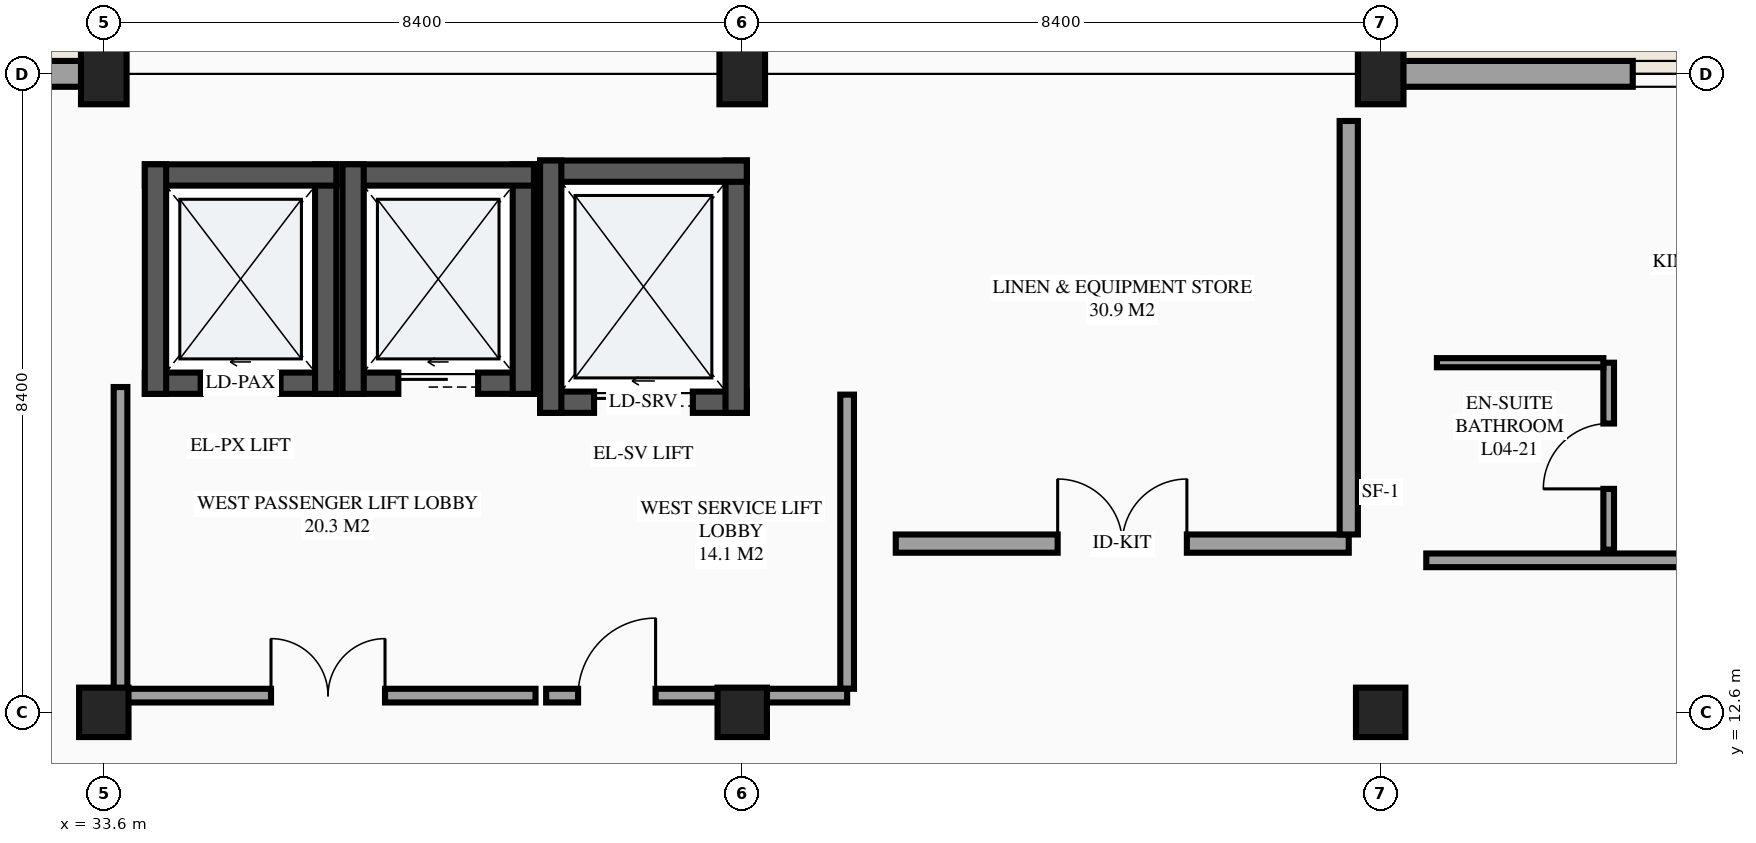
"""IFC4 building model, lengths in metres.
Left out: names, types, materials, properties, quantities, classifications, styles, units other than length and angle.
Written with IfcOpenShell. Run it as: python <this file> out.ifc"""

import sys

from ifc_helpers import new_model, si_unit, direction, frame, frame_2d, origin, origin_2d, place, context, subcontext, project, spatial, rectangle, extrude, element, fill, save


model = new_model("IFC4")
c1 = context("Model", 3, precision=1e-05, world=origin(), true_north=direction((0.0, 1.0)))
c2 = subcontext(c1, "Body", "Model", "MODEL_VIEW")
j1 = project(units=[si_unit("LENGTHUNIT", "METRE"), si_unit("PLANEANGLEUNIT", "RADIAN")], contexts=[c1])
p1 = place(None, origin())
s1 = spatial("IfcSite", under=j1, at=p1, CompositionType="ELEMENT")
p2 = place(p1, origin())
s2 = spatial("IfcBuilding", under=s1, at=p2, CompositionType="ELEMENT")
p3 = place(p2, frame((0.0, 0.0, 18.3)))
s3 = spatial("IfcBuildingStorey", under=s2, at=p3, CompositionType="ELEMENT", Elevation=18.3)
p4 = place(p3, frame((33.6, 12.6, 0.0), z_axis=(0.0, 0.0, 1.0), x_axis=(1.0, 0.0, 0.0)))
e1 = element("IfcColumn", 1, at=p4, inside=s3, PredefinedType="COLUMN", context=c2, shape_type="SweptSolid", body=[
    extrude(rectangle(XDim=0.65, YDim=0.65, at=origin_2d()), origin(), (0.0, 0.0, 1.0), 3.6),
])
p5 = place(p3, frame((33.6, 21.0, 0.0), z_axis=(0.0, 0.0, 1.0), x_axis=(1.0, 0.0, 0.0)))
e2 = element("IfcColumn", 2, at=p5, inside=s3, PredefinedType="COLUMN", context=c2, shape_type="SweptSolid", body=[
    extrude(rectangle(XDim=0.6, YDim=0.8, at=origin_2d()), origin(), (0.0, 0.0, 1.0), 3.6),
])
p6 = place(p3, frame((42.0, 12.6, 0.0), z_axis=(0.0, 0.0, 1.0), x_axis=(1.0, 0.0, 0.0)))
e3 = element("IfcColumn", 3, at=p6, inside=s3, PredefinedType="COLUMN", context=c2, shape_type="SweptSolid", body=[
    extrude(rectangle(XDim=0.65, YDim=0.65, at=origin_2d()), origin(), (0.0, 0.0, 1.0), 3.6),
])
p7 = place(p3, frame((42.0, 21.0, 0.0), z_axis=(0.0, 0.0, 1.0), x_axis=(1.0, 0.0, 0.0)))
e4 = element("IfcColumn", 4, at=p7, inside=s3, PredefinedType="COLUMN", context=c2, shape_type="SweptSolid", body=[
    extrude(rectangle(XDim=0.6, YDim=0.8, at=origin_2d()), origin(), (0.0, 0.0, 1.0), 3.6),
])
p8 = place(p3, frame((50.4, 12.6, 0.0), z_axis=(0.0, 0.0, 1.0), x_axis=(1.0, 0.0, 0.0)))
e5 = element("IfcColumn", 5, at=p8, inside=s3, PredefinedType="COLUMN", context=c2, shape_type="SweptSolid", body=[
    extrude(rectangle(XDim=0.65, YDim=0.65, at=origin_2d()), origin(), (0.0, 0.0, 1.0), 3.6),
])
p9 = place(p3, frame((50.4, 21.0, 0.0), z_axis=(0.0, 0.0, 1.0), x_axis=(1.0, 0.0, 0.0)))
e6 = element("IfcColumn", 6, at=p9, inside=s3, PredefinedType="COLUMN", context=c2, shape_type="SweptSolid", body=[
    extrude(rectangle(XDim=0.6, YDim=0.8, at=origin_2d()), origin(), (0.0, 0.0, 1.0), 3.6),
])
p10 = place(p3, frame((33.6, 21.0, 0.0), z_axis=(0.0, 0.0, 1.0), x_axis=(-1.0, 0.0, 0.0)))
e7 = element("IfcWall", 7, at=p10, inside=s3, PredefinedType="STANDARD", context=c2, shape_type="SweptSolid", body=[
    extrude(rectangle(XDim=2.0, YDim=0.34, at=frame_2d((1.0, 0.0))), origin(), (0.0, 0.0, 1.0), 2.53),
])
p11 = place(p3, frame((34.14, 16.93, 0.0), z_axis=(0.0, 0.0, 1.0), x_axis=(1.0, 0.0, 0.0)))
e8 = element("IfcWall", 8, at=p11, inside=s3, PredefinedType="SHEAR", context=c2, shape_type="SweptSolid", body=[
    extrude(rectangle(XDim=2.52, YDim=0.28, at=frame_2d((1.26, 0.0))), origin(), (0.0, 0.0, 1.0), 3.6),
])
p12 = place(p11, frame((0.735, 0.0, 0.0)))
e9 = element("IfcOpeningElement", 9, at=p12, cuts=e8, PredefinedType="OPENING", context=c2, shape_type="SweptSolid", body=[
    extrude(rectangle(XDim=1.05, YDim=2.2, at=frame_2d((0.525, 1.1))), frame((0.0, 0.15, 0.0), z_axis=(0.0, -1.0, 0.0), x_axis=(1.0, 0.0, 0.0)), (0.0, 0.0, 1.0), 0.3),
])
p13 = place(p3, frame((36.52, 16.79, 0.0), z_axis=(0.0, 0.0, 1.0), x_axis=(0.0, 1.0, 0.0)))
e10 = element("IfcWall", 10, at=p13, inside=s3, PredefinedType="SHEAR", context=c2, shape_type="SweptSolid", body=[
    extrude(rectangle(XDim=3.02, YDim=0.28, at=frame_2d((1.51, 0.0))), origin(), (0.0, 0.0, 1.0), 3.6),
])
p14 = place(p3, frame((36.66, 19.67, 0.0), z_axis=(0.0, 0.0, 1.0), x_axis=(-1.0, 0.0, 0.0)))
e11 = element("IfcWall", 11, at=p14, inside=s3, PredefinedType="SHEAR", context=c2, shape_type="SweptSolid", body=[
    extrude(rectangle(XDim=2.52, YDim=0.28, at=frame_2d((1.26, 0.0))), origin(), (0.0, 0.0, 1.0), 3.6),
])
p15 = place(p3, frame((34.28, 19.81, 0.0), z_axis=(0.0, 0.0, 1.0), x_axis=(0.0, -1.0, 0.0)))
e12 = element("IfcWall", 12, at=p15, inside=s3, PredefinedType="SHEAR", context=c2, shape_type="SweptSolid", body=[
    extrude(rectangle(XDim=3.02, YDim=0.28, at=frame_2d((1.51, 0.0))), origin(), (0.0, 0.0, 1.0), 3.6),
])
p16 = place(p3, frame((36.74, 16.93, 0.0), z_axis=(0.0, 0.0, 1.0), x_axis=(1.0, 0.0, 0.0)))
e13 = element("IfcWall", 13, at=p16, inside=s3, PredefinedType="SHEAR", context=c2, shape_type="SweptSolid", body=[
    extrude(rectangle(XDim=2.52, YDim=0.28, at=frame_2d((1.26, 0.0))), origin(), (0.0, 0.0, 1.0), 3.6),
])
p17 = place(p16, frame((0.735, 0.0, 0.0)))
e14 = element("IfcOpeningElement", 14, at=p17, cuts=e13, PredefinedType="OPENING", context=c2, shape_type="SweptSolid", body=[
    extrude(rectangle(XDim=1.05, YDim=2.2, at=frame_2d((0.525, 1.1))), frame((0.0, 0.15, 0.0), z_axis=(0.0, -1.0, 0.0), x_axis=(1.0, 0.0, 0.0)), (0.0, 0.0, 1.0), 0.3),
])
p18 = place(p3, frame((39.12, 16.79, 0.0), z_axis=(0.0, 0.0, 1.0), x_axis=(0.0, 1.0, 0.0)))
e15 = element("IfcWall", 15, at=p18, inside=s3, PredefinedType="SHEAR", context=c2, shape_type="SweptSolid", body=[
    extrude(rectangle(XDim=3.02, YDim=0.28, at=frame_2d((1.51, 0.0))), origin(), (0.0, 0.0, 1.0), 3.6),
])
p19 = place(p3, frame((39.26, 19.67, 0.0), z_axis=(0.0, 0.0, 1.0), x_axis=(-1.0, 0.0, 0.0)))
e16 = element("IfcWall", 16, at=p19, inside=s3, PredefinedType="SHEAR", context=c2, shape_type="SweptSolid", body=[
    extrude(rectangle(XDim=2.52, YDim=0.28, at=frame_2d((1.26, 0.0))), origin(), (0.0, 0.0, 1.0), 3.6),
])
p20 = place(p3, frame((36.88, 19.81, 0.0), z_axis=(0.0, 0.0, 1.0), x_axis=(0.0, -1.0, 0.0)))
e17 = element("IfcWall", 17, at=p20, inside=s3, PredefinedType="SHEAR", context=c2, shape_type="SweptSolid", body=[
    extrude(rectangle(XDim=3.02, YDim=0.28, at=frame_2d((1.51, 0.0))), origin(), (0.0, 0.0, 1.0), 3.6),
])
p21 = place(p3, frame((39.34, 16.68, 0.0), z_axis=(0.0, 0.0, 1.0), x_axis=(1.0, 0.0, 0.0)))
e18 = element("IfcWall", 18, at=p21, inside=s3, PredefinedType="SHEAR", context=c2, shape_type="SweptSolid", body=[
    extrude(rectangle(XDim=2.72, YDim=0.28, at=frame_2d((1.36, 0.0))), origin(), (0.0, 0.0, 1.0), 3.6),
])
p22 = place(p21, frame((0.71, 0.0, 0.0)))
e19 = element("IfcOpeningElement", 19, at=p22, cuts=e18, PredefinedType="OPENING", context=c2, shape_type="SweptSolid", body=[
    extrude(rectangle(XDim=1.3, YDim=2.25, at=frame_2d((0.65, 1.125))), frame((0.0, 0.15, 0.0), z_axis=(0.0, -1.0, 0.0), x_axis=(1.0, 0.0, 0.0)), (0.0, 0.0, 1.0), 0.3),
])
p23 = place(p3, frame((41.92, 16.54, 0.0), z_axis=(0.0, 0.0, 1.0), x_axis=(0.0, 1.0, 0.0)))
e20 = element("IfcWall", 20, at=p23, inside=s3, PredefinedType="SHEAR", context=c2, shape_type="SweptSolid", body=[
    extrude(rectangle(XDim=3.32, YDim=0.28, at=frame_2d((1.66, 0.0))), origin(), (0.0, 0.0, 1.0), 3.6),
])
p24 = place(p3, frame((42.06, 19.72, 0.0), z_axis=(0.0, 0.0, 1.0), x_axis=(-1.0, 0.0, 0.0)))
e21 = element("IfcWall", 21, at=p24, inside=s3, PredefinedType="SHEAR", context=c2, shape_type="SweptSolid", body=[
    extrude(rectangle(XDim=2.72, YDim=0.28, at=frame_2d((1.36, 0.0))), origin(), (0.0, 0.0, 1.0), 3.6),
])
p25 = place(p3, frame((39.48, 19.86, 0.0), z_axis=(0.0, 0.0, 1.0), x_axis=(0.0, -1.0, 0.0)))
e22 = element("IfcWall", 22, at=p25, inside=s3, PredefinedType="SHEAR", context=c2, shape_type="SweptSolid", body=[
    extrude(rectangle(XDim=3.32, YDim=0.28, at=frame_2d((1.66, 0.0))), origin(), (0.0, 0.0, 1.0), 3.6),
])
p26 = place(p3, frame((51.0, 14.6, 0.0), z_axis=(0.0, 0.0, 1.0), x_axis=(1.0, 0.0, 0.0)))
e23 = element("IfcWall", 23, at=p26, inside=s3, PredefinedType="PARTITIONING", context=c2, shape_type="SweptSolid", body=[
    extrude(rectangle(XDim=6.933, YDim=0.18, at=frame_2d((3.467, 0.0))), origin(), (0.0, 0.0, 1.0), 3.375),
])
p27 = place(p26, frame((4.686, 0.0, 0.0)))
e24 = element("IfcOpeningElement", 24, at=p27, cuts=e23, PredefinedType="OPENING", context=c2, shape_type="SweptSolid", body=[
    extrude(rectangle(XDim=0.96, YDim=2.15, at=frame_2d((0.48, 1.075))), frame((0.0, 0.1, 0.0), z_axis=(0.0, -1.0, 0.0), x_axis=(1.0, 0.0, 0.0)), (0.0, 0.0, 1.0), 0.2),
])
p28 = place(p3, frame((53.4, 14.74, 0.0), z_axis=(0.0, 0.0, 1.0), x_axis=(0.0, 1.0, 0.0)))
e25 = element("IfcWall", 25, at=p28, inside=s3, PredefinedType="PARTITIONING", context=c2, shape_type="SweptSolid", body=[
    extrude(rectangle(XDim=2.46, YDim=0.14, at=frame_2d((1.23, 0.0))), origin(), (0.0, 0.0, 1.0), 3.375),
])
p29 = place(p28, frame((0.8, 0.0, 0.0)))
e26 = element("IfcOpeningElement", 26, at=p29, cuts=e25, PredefinedType="OPENING", context=c2, shape_type="SweptSolid", body=[
    extrude(rectangle(XDim=0.86, YDim=2.1, at=frame_2d((0.43, 1.05))), frame((0.0, 0.08, 0.0), z_axis=(0.0, -1.0, 0.0), x_axis=(1.0, 0.0, 0.0)), (0.0, 0.0, 1.0), 0.16),
])
p30 = place(p3, frame((51.14, 17.2, 0.0), z_axis=(0.0, 0.0, 1.0), x_axis=(1.0, 0.0, 0.0)))
e27 = element("IfcWall", 27, at=p30, inside=s3, PredefinedType="PARTITIONING", context=c2, shape_type="SweptSolid", body=[
    extrude(rectangle(XDim=2.19, YDim=0.12, at=frame_2d((1.095, 0.0))), origin(), (0.0, 0.0, 1.0), 3.375),
])
p31 = place(p3, frame((33.82, 12.82, 0.0), z_axis=(0.0, 0.0, 1.0), x_axis=(1.0, 0.0, 0.0)))
e28 = element("IfcWall", 28, at=p31, inside=s3, PredefinedType="PARTITIONING", context=c2, shape_type="SweptSolid", body=[
    extrude(rectangle(XDim=5.46, YDim=0.18, at=frame_2d((2.73, 0.0))), origin(), (0.0, 0.0, 1.0), 2.53),
])
p32 = place(p31, frame((1.98, 0.0, 0.0)))
e29 = element("IfcOpeningElement", 29, at=p32, cuts=e28, PredefinedType="OPENING", context=c2, shape_type="SweptSolid", body=[
    extrude(rectangle(XDim=1.5, YDim=2.15, at=frame_2d((0.75, 1.075))), frame((0.0, 0.1, 0.0), z_axis=(0.0, -1.0, 0.0), x_axis=(1.0, 0.0, 0.0)), (0.0, 0.0, 1.0), 0.2),
])
p33 = place(p3, frame((33.82, 12.91, 0.0), z_axis=(0.0, 0.0, 1.0), x_axis=(0.0, 1.0, 0.0)))
e30 = element("IfcWall", 30, at=p33, inside=s3, PredefinedType="PARTITIONING", context=c2, shape_type="SweptSolid", body=[
    extrude(rectangle(XDim=3.97, YDim=0.18, at=frame_2d((1.985, 0.0))), origin(), (0.0, 0.0, 1.0), 2.73),
])
p34 = place(p3, frame((39.42, 12.82, 0.0), z_axis=(0.0, 0.0, 1.0), x_axis=(1.0, 0.0, 0.0)))
e31 = element("IfcWall", 31, at=p34, inside=s3, PredefinedType="PARTITIONING", context=c2, shape_type="SweptSolid", body=[
    extrude(rectangle(XDim=2.58, YDim=0.18, at=frame_2d((1.29, 0.0))), origin(), (0.0, 0.0, 1.0), 2.53),
])
p35 = place(p34, frame((0.42, 0.0, 0.0)))
e32 = element("IfcOpeningElement", 32, at=p35, cuts=e31, PredefinedType="OPENING", context=c2, shape_type="SweptSolid", body=[
    extrude(rectangle(XDim=1.02, YDim=2.15, at=frame_2d((0.51, 1.075))), frame((0.0, 0.1, 0.0), z_axis=(0.0, -1.0, 0.0), x_axis=(1.0, 0.0, 0.0)), (0.0, 0.0, 1.0), 0.2),
])
p36 = place(p3, frame((43.38, 12.91, 0.0), z_axis=(0.0, 0.0, 1.0), x_axis=(0.0, 1.0, 0.0)))
e33 = element("IfcWall", 33, at=p36, inside=s3, PredefinedType="PARTITIONING", context=c2, shape_type="SweptSolid", body=[
    extrude(rectangle(XDim=3.87, YDim=0.18, at=frame_2d((1.935, 0.0))), origin(), (0.0, 0.0, 1.0), 3.375),
])
p37 = place(p3, frame((44.02, 14.82, 0.0), z_axis=(0.0, 0.0, 1.0), x_axis=(1.0, 0.0, 0.0)))
e34 = element("IfcWall", 34, at=p37, inside=s3, PredefinedType="PARTITIONING", context=c2, shape_type="SweptSolid", body=[
    extrude(rectangle(XDim=5.96, YDim=0.24, at=frame_2d((2.98, 0.0))), origin(), (0.0, 0.0, 1.0), 3.375),
])
p38 = place(p37, frame((2.13, 0.0, 0.0)))
e35 = element("IfcOpeningElement", 35, at=p38, cuts=e34, PredefinedType="OPENING", context=c2, shape_type="SweptSolid", body=[
    extrude(rectangle(XDim=1.7, YDim=2.2, at=frame_2d((0.85, 1.1))), frame((0.0, 0.13, 0.0), z_axis=(0.0, -1.0, 0.0), x_axis=(1.0, 0.0, 0.0)), (0.0, 0.0, 1.0), 0.26),
])
p39 = place(p3, frame((49.98, 14.94, 0.0), z_axis=(0.0, 0.0, 1.0), x_axis=(0.0, 1.0, 0.0)))
e36 = element("IfcWall", 36, at=p39, inside=s3, PredefinedType="PARTITIONING", context=c2, shape_type="SweptSolid", body=[
    extrude(rectangle(XDim=5.44, YDim=0.24, at=frame_2d((2.72, 0.0))), origin(), (0.0, 0.0, 1.0), 3.375),
])
p40 = place(p3, frame((58.8, 21.0, 0.0), z_axis=(0.0, 0.0, 1.0), x_axis=(-1.0, 0.0, 0.0)))
e37 = element("IfcWall", 37, at=p40, inside=s3, PredefinedType="STANDARD", context=c2, shape_type="SweptSolid", body=[
    extrude(rectangle(XDim=8.4, YDim=0.34, at=frame_2d((4.2, 0.0))), origin(), (0.0, 0.0, 1.0), 2.53),
])
p41 = place(p40, frame((3.583, 0.0, 0.85)))
e38 = element("IfcOpeningElement", 38, at=p41, cuts=e37, PredefinedType="OPENING", context=c2, shape_type="SweptSolid", body=[
    extrude(rectangle(XDim=1.5, YDim=1.5, at=frame_2d((0.75, 0.75))), frame((0.0, 0.18, 0.0), z_axis=(0.0, -1.0, 0.0), x_axis=(1.0, 0.0, 0.0)), (0.0, 0.0, 1.0), 0.36),
])
p42 = place(p3, frame((50.4, 21.0, 0.0), z_axis=(0.0, 0.0, 1.0), x_axis=(0.0, 1.0, 0.0)))
e39 = element("IfcWall", 39, at=p42, inside=s3, PredefinedType="STANDARD", context=c2, shape_type="SweptSolid", body=[
    extrude(rectangle(XDim=8.4, YDim=0.34, at=frame_2d((4.2, 0.0))), origin(), (0.0, 0.0, 1.0), 2.63),
])
p43 = place(p42, frame((2.4, 0.0, 0.85)))
e40 = element("IfcOpeningElement", 40, at=p43, cuts=e39, PredefinedType="OPENING", context=c2, shape_type="SweptSolid", body=[
    extrude(rectangle(XDim=1.5, YDim=1.5, at=frame_2d((0.75, 0.75))), frame((0.0, 0.18, 0.0), z_axis=(0.0, -1.0, 0.0), x_axis=(1.0, 0.0, 0.0)), (0.0, 0.0, 1.0), 0.36),
])
p44 = place(p3, frame((33.6, 29.4, 0.0), z_axis=(0.0, 0.0, 1.0), x_axis=(0.0, -1.0, 0.0)))
e41 = element("IfcWall", 41, at=p44, inside=s3, PredefinedType="STANDARD", context=c2, shape_type="SweptSolid", body=[
    extrude(rectangle(XDim=8.4, YDim=0.34, at=frame_2d((4.2, 0.0))), origin(), (0.0, 0.0, 1.0), 3.075),
])
p45 = place(p44, frame((4.106, 0.0, 0.85)))
e42 = element("IfcOpeningElement", 42, at=p45, cuts=e41, PredefinedType="OPENING", context=c2, shape_type="SweptSolid", body=[
    extrude(rectangle(XDim=1.5, YDim=1.5, at=frame_2d((0.75, 0.75))), frame((0.0, 0.18, 0.0), z_axis=(0.0, -1.0, 0.0), x_axis=(1.0, 0.0, 0.0)), (0.0, 0.0, 1.0), 0.36),
])
p46 = place(p3, frame((42.0, 12.82, 0.0), z_axis=(0.0, 0.0, 1.0), x_axis=(1.0, 0.0, 0.0)))
e43 = element("IfcWall", 43, at=p46, inside=s3, PredefinedType="PARTITIONING", context=c2, shape_type="SweptSolid", body=[
    extrude(rectangle(XDim=1.38, YDim=0.18, at=frame_2d((0.69, 0.0))), origin(), (0.0, 0.0, 1.0), 2.63),
])
p47 = place(p41, origin())
e44 = element("IfcWindow", 44, at=p47, inside=s3, PartitioningType="SINGLE_PANEL", PredefinedType="WINDOW", context=c2, shape_type="SweptSolid", body=[
    extrude(rectangle(XDim=1.5, YDim=1.5, at=frame_2d((0.75, 0.75))), frame((0.0, 0.03, 0.0), z_axis=(0.0, -1.0, 0.0), x_axis=(1.0, 0.0, 0.0)), (0.0, 0.0, 1.0), 0.06),
])
fill(e38, e44)
p48 = place(p12, origin())
e45 = element("IfcDoor", 45, at=p48, inside=s3, OperationType="SLIDING_TO_LEFT", PredefinedType="DOOR", context=c2, shape_type="SweptSolid", body=[
    extrude(rectangle(XDim=1.05, YDim=2.2, at=frame_2d((0.525, 1.1))), frame((0.0, 0.025, 0.0), z_axis=(0.0, -1.0, 0.0), x_axis=(1.0, 0.0, 0.0)), (0.0, 0.0, 1.0), 0.05),
])
fill(e9, e45)
p49 = place(p17, origin())
e46 = element("IfcDoor", 46, at=p49, inside=s3, OperationType="SLIDING_TO_LEFT", PredefinedType="DOOR", context=c2, shape_type="SweptSolid", body=[
    extrude(rectangle(XDim=1.05, YDim=2.2, at=frame_2d((0.525, 1.1))), frame((0.0, 0.025, 0.0), z_axis=(0.0, -1.0, 0.0), x_axis=(1.0, 0.0, 0.0)), (0.0, 0.0, 1.0), 0.05),
])
fill(e14, e46)
p50 = place(p22, origin())
e47 = element("IfcDoor", 47, at=p50, inside=s3, OperationType="SLIDING_TO_LEFT", PredefinedType="DOOR", context=c2, shape_type="SweptSolid", body=[
    extrude(rectangle(XDim=1.3, YDim=2.25, at=frame_2d((0.65, 1.125))), frame((0.0, 0.025, 0.0), z_axis=(0.0, -1.0, 0.0), x_axis=(1.0, 0.0, 0.0)), (0.0, 0.0, 1.0), 0.05),
])
fill(e19, e47)
p51 = place(p29, origin())
e48 = element("IfcDoor", 48, at=p51, inside=s3, OperationType="SINGLE_SWING_LEFT", PredefinedType="DOOR", context=c2, shape_type="SweptSolid", body=[
    extrude(rectangle(XDim=0.86, YDim=2.1, at=frame_2d((0.43, 1.05))), frame((0.0, 0.025, 0.0), z_axis=(0.0, -1.0, 0.0), x_axis=(1.0, 0.0, 0.0)), (0.0, 0.0, 1.0), 0.05),
])
fill(e26, e48)
p52 = place(p32, origin())
e49 = element("IfcDoor", 49, at=p52, inside=s3, OperationType="DOUBLE_DOOR_SINGLE_SWING", PredefinedType="DOOR", context=c2, shape_type="SweptSolid", body=[
    extrude(rectangle(XDim=1.5, YDim=2.15, at=frame_2d((0.75, 1.075))), frame((0.0, 0.025, 0.0), z_axis=(0.0, -1.0, 0.0), x_axis=(1.0, 0.0, 0.0)), (0.0, 0.0, 1.0), 0.05),
])
fill(e29, e49)
p53 = place(p35, origin())
e50 = element("IfcDoor", 50, at=p53, inside=s3, OperationType="SINGLE_SWING_RIGHT", PredefinedType="DOOR", context=c2, shape_type="SweptSolid", body=[
    extrude(rectangle(XDim=1.02, YDim=2.15, at=frame_2d((0.51, 1.075))), frame((0.0, 0.025, 0.0), z_axis=(0.0, -1.0, 0.0), x_axis=(1.0, 0.0, 0.0)), (0.0, 0.0, 1.0), 0.05),
])
fill(e32, e50)
p54 = place(p38, origin())
e51 = element("IfcDoor", 51, at=p54, inside=s3, OperationType="DOUBLE_DOOR_SINGLE_SWING", PredefinedType="DOOR", context=c2, shape_type="SweptSolid", body=[
    extrude(rectangle(XDim=1.7, YDim=2.2, at=frame_2d((0.85, 1.1))), frame((0.0, 0.025, 0.0), z_axis=(0.0, -1.0, 0.0), x_axis=(1.0, 0.0, 0.0)), (0.0, 0.0, 1.0), 0.05),
])
fill(e35, e51)
save(model, sys.argv[1])
